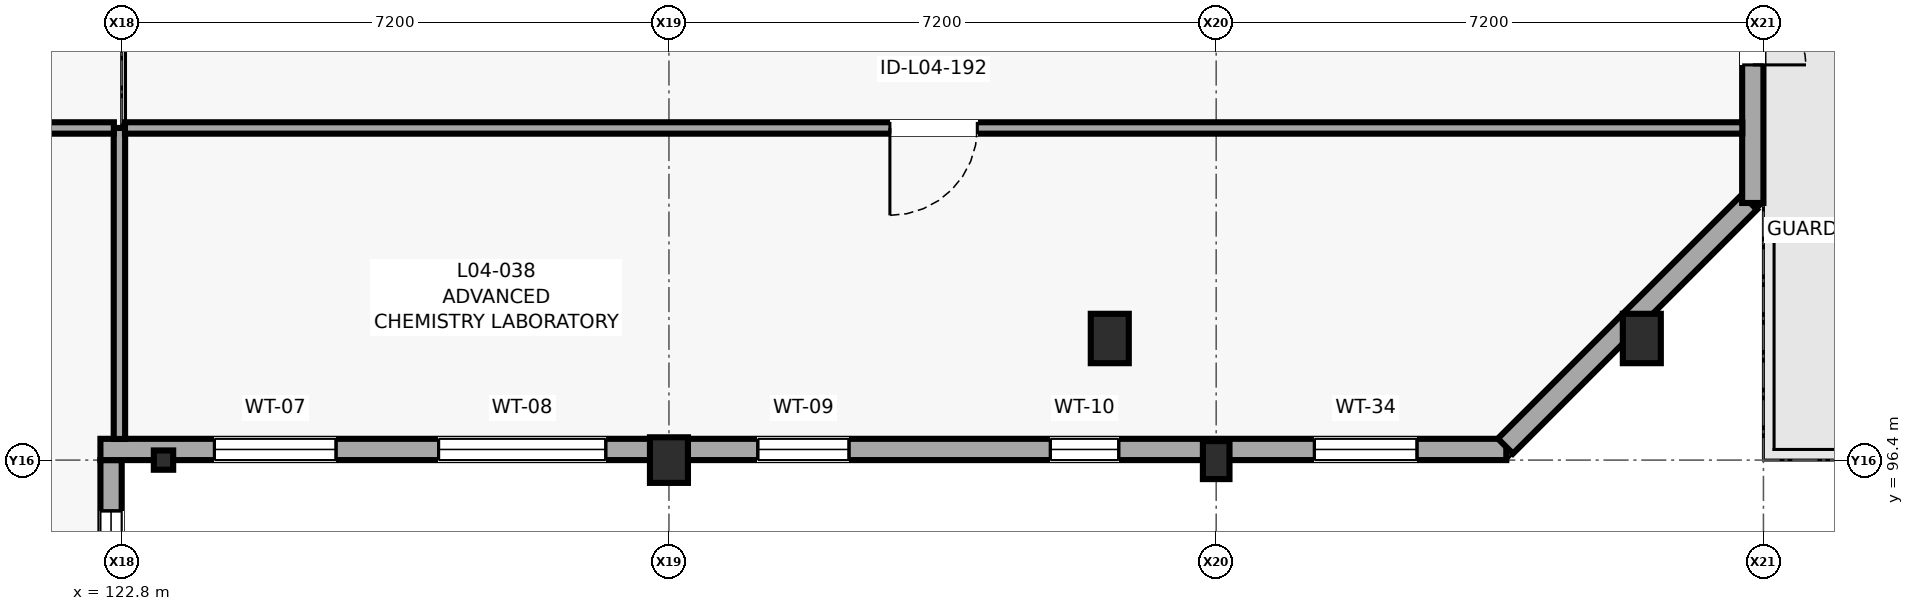
"""IFC4 building model, lengths in metres.
Left out: names, types, materials, properties, quantities, classifications, styles, units other than length and angle.
Written with IfcOpenShell. Run it as: python <this file> out.ifc"""

import sys

from ifc_helpers import new_model, si_unit, direction, frame, frame_2d, origin, origin_2d, place, context, subcontext, project, spatial, rectangle, i_section, extrude, element, fill, save


model = new_model("IFC4")
c1 = context("Model", 3, precision=1e-05, world=origin(), true_north=direction((0.0, 1.0)))
c2 = subcontext(c1, "Body", "Model", "MODEL_VIEW")
j1 = project(units=[si_unit("LENGTHUNIT", "METRE"), si_unit("PLANEANGLEUNIT", "RADIAN")], contexts=[c1])
p1 = place(None, origin())
s1 = spatial("IfcSite", under=j1, at=p1, CompositionType="ELEMENT")
p2 = place(p1, origin())
s2 = spatial("IfcBuilding", under=s1, at=p2, CompositionType="ELEMENT")
p3 = place(p2, frame((0.0, 0.0, 16.2)))
s3 = spatial("IfcBuildingStorey", under=s2, at=p3, CompositionType="ELEMENT", Elevation=16.2)
p4 = place(p3, frame((123.35, 96.4, 0.0), z_axis=(0.0, 0.0, 1.0), x_axis=(1.0, 0.0, 0.0)))
e1 = element("IfcColumn", 1, at=p4, inside=s3, PredefinedType="COLUMN", context=c2, shape_type="SweptSolid", body=[
    extrude(i_section(OverallWidth=0.255, OverallDepth=0.254, WebThickness=0.009, FlangeThickness=0.014, FilletRadius=0.013, at=origin_2d()), origin(), (0.0, 0.0, 1.0), 4.0),
])
p5 = place(p3, frame((130.0, 96.4, 0.0), z_axis=(0.0, 0.0, 1.0), x_axis=(1.0, 0.0, 0.0)))
e2 = element("IfcColumn", 2, at=p5, inside=s3, PredefinedType="PILASTER", context=c2, shape_type="SweptSolid", body=[
    extrude(rectangle(XDim=0.5, YDim=0.6, at=origin_2d()), origin(), (0.0, 0.0, 1.0), 4.0),
])
p6 = place(p3, frame((135.8, 98.0, 0.0), z_axis=(0.0, 0.0, 1.0), x_axis=(1.0, 0.0, 0.0)))
e3 = element("IfcColumn", 3, at=p6, inside=s3, PredefinedType="COLUMN", context=c2, shape_type="SweptSolid", body=[
    extrude(rectangle(XDim=0.5, YDim=0.65, at=origin_2d()), origin(), (0.0, 0.0, 1.0), 4.0),
])
p7 = place(p3, frame((137.2, 96.4, 0.0), z_axis=(0.0, 0.0, 1.0), x_axis=(1.0, 0.0, 0.0)))
e4 = element("IfcColumn", 4, at=p7, inside=s3, PredefinedType="PILASTER", context=c2, shape_type="SweptSolid", body=[
    extrude(rectangle(XDim=0.35, YDim=0.5, at=origin_2d()), origin(), (0.0, 0.0, 1.0), 4.0),
])
p8 = place(p3, frame((142.8, 98.0, 0.0), z_axis=(0.0, 0.0, 1.0), x_axis=(1.0, 0.0, 0.0)))
e5 = element("IfcColumn", 5, at=p8, inside=s3, PredefinedType="COLUMN", context=c2, shape_type="SweptSolid", body=[
    extrude(rectangle(XDim=0.5, YDim=0.65, at=origin_2d()), origin(), (0.0, 0.0, 1.0), 4.0),
])
p9 = place(p3, frame((122.66, 84.14, 0.0), z_axis=(0.0, 0.0, 1.0), x_axis=(0.0, 1.0, 0.0)))
e6 = element("IfcWall", 6, at=p9, inside=s3, PredefinedType="SOLIDWALL", context=c2, shape_type="SweptSolid", body=[
    extrude(rectangle(XDim=12.26, YDim=0.28, at=frame_2d((6.13, 0.0))), origin(), (0.0, 0.0, 1.0), 3.225),
])
p10 = place(p9, frame((2.343, 0.0, 0.75)))
e7 = element("IfcOpeningElement", 7, at=p10, cuts=e6, PredefinedType="OPENING", context=c2, shape_type="SweptSolid", body=[
    extrude(rectangle(XDim=1.1, YDim=2.1, at=frame_2d((0.55, 1.05))), frame((0.0, 0.15, 0.0), z_axis=(0.0, -1.0, 0.0), x_axis=(1.0, 0.0, 0.0)), (0.0, 0.0, 1.0), 0.3),
])
p11 = place(p9, frame((5.555, 0.0, 1.05)))
e8 = element("IfcOpeningElement", 8, at=p11, cuts=e6, PredefinedType="OPENING", context=c2, shape_type="SweptSolid", body=[
    extrude(rectangle(XDim=1.15, YDim=1.4, at=frame_2d((0.575, 0.7))), frame((0.0, 0.15, 0.0), z_axis=(0.0, -1.0, 0.0), x_axis=(1.0, 0.0, 0.0)), (0.0, 0.0, 1.0), 0.3),
])
p12 = place(p9, frame((10.542, 0.0, 1.05)))
e9 = element("IfcOpeningElement", 9, at=p12, cuts=e6, PredefinedType="OPENING", context=c2, shape_type="SweptSolid", body=[
    extrude(rectangle(XDim=1.05, YDim=1.3, at=frame_2d((0.525, 0.65))), frame((0.0, 0.15, 0.0), z_axis=(0.0, -1.0, 0.0), x_axis=(1.0, 0.0, 0.0)), (0.0, 0.0, 1.0), 0.3),
])
p13 = place(p3, frame((122.52, 96.54, 0.0), z_axis=(0.0, 0.0, 1.0), x_axis=(1.0, 0.0, 0.0)))
e10 = element("IfcWall", 10, at=p13, inside=s3, PredefinedType="SOLIDWALL", context=c2, shape_type="SweptSolid", body=[
    extrude(rectangle(XDim=18.497, YDim=0.28, at=frame_2d((9.249, 0.0))), origin(), (0.0, 0.0, 1.0), 3.025),
])
p14 = place(p13, frame((1.5, 0.0, 1.05)))
e11 = element("IfcOpeningElement", 11, at=p14, cuts=e10, PredefinedType="OPENING", context=c2, shape_type="SweptSolid", body=[
    extrude(rectangle(XDim=1.6, YDim=1.35, at=frame_2d((0.8, 0.675))), frame((0.0, 0.15, 0.0), z_axis=(0.0, -1.0, 0.0), x_axis=(1.0, 0.0, 0.0)), (0.0, 0.0, 1.0), 0.3),
])
p15 = place(p13, frame((4.449, 0.0, 1.05)))
e12 = element("IfcOpeningElement", 12, at=p15, cuts=e10, PredefinedType="OPENING", context=c2, shape_type="SweptSolid", body=[
    extrude(rectangle(XDim=2.2, YDim=1.35, at=frame_2d((1.1, 0.675))), frame((0.0, 0.15, 0.0), z_axis=(0.0, -1.0, 0.0), x_axis=(1.0, 0.0, 0.0)), (0.0, 0.0, 1.0), 0.3),
])
p16 = place(p13, frame((8.649, 0.0, 1.05)))
e13 = element("IfcOpeningElement", 13, at=p16, cuts=e10, PredefinedType="OPENING", context=c2, shape_type="SweptSolid", body=[
    extrude(rectangle(XDim=1.2, YDim=0.9, at=frame_2d((0.6, 0.45))), frame((0.0, 0.15, 0.0), z_axis=(0.0, -1.0, 0.0), x_axis=(1.0, 0.0, 0.0)), (0.0, 0.0, 1.0), 0.3),
])
p17 = place(p13, frame((12.498, 0.0, 1.05)))
e14 = element("IfcOpeningElement", 14, at=p17, cuts=e10, PredefinedType="OPENING", context=c2, shape_type="SweptSolid", body=[
    extrude(rectangle(XDim=0.9, YDim=0.9, at=frame_2d((0.45, 0.45))), frame((0.0, 0.15, 0.0), z_axis=(0.0, -1.0, 0.0), x_axis=(1.0, 0.0, 0.0)), (0.0, 0.0, 1.0), 0.3),
])
p18 = place(p13, frame((15.972, 0.0, 1.05)))
e15 = element("IfcOpeningElement", 15, at=p18, cuts=e10, PredefinedType="OPENING", context=c2, shape_type="SweptSolid", body=[
    extrude(rectangle(XDim=1.35, YDim=1.2, at=frame_2d((0.675, 0.6))), frame((0.0, 0.15, 0.0), z_axis=(0.0, -1.0, 0.0), x_axis=(1.0, 0.0, 0.0)), (0.0, 0.0, 1.0), 0.3),
])
p19 = place(p3, frame((141.005, 96.584, 0.0), z_axis=(0.0, 0.0, 1.0), x_axis=(0.707133661755, 0.707079899597, 0.0)))
e16 = element("IfcWall", 16, at=p19, inside=s3, PredefinedType="SOLIDWALL", context=c2, shape_type="SweptSolid", body=[
    extrude(rectangle(XDim=4.541, YDim=0.28, at=frame_2d((2.271, 0.0))), origin(), (0.0, 0.0, 1.0), 3.78),
])
p20 = place(p3, frame((144.26, 99.783, 0.0), z_axis=(0.0, 0.0, 1.0), x_axis=(0.0, 1.0, 0.0)))
e17 = element("IfcWall", 17, at=p20, inside=s3, PredefinedType="SOLIDWALL", context=c2, shape_type="SweptSolid", body=[
    extrude(rectangle(XDim=8.834, YDim=0.28, at=frame_2d((4.417, 0.0))), origin(), (0.0, 0.0, 1.0), 3.78),
])
p21 = place(p20, frame((1.817, 0.0, 0.0)))
e18 = element("IfcOpeningElement", 18, at=p21, cuts=e17, PredefinedType="OPENING", context=c2, shape_type="SweptSolid", body=[
    extrude(rectangle(XDim=1.4, YDim=2.15, at=frame_2d((0.7, 1.075))), frame((0.0, 0.15, 0.0), z_axis=(0.0, -1.0, 0.0), x_axis=(1.0, 0.0, 0.0)), (0.0, 0.0, 1.0), 0.3),
])
p22 = place(p20, frame((5.876, 0.0, 0.75)))
e19 = element("IfcOpeningElement", 19, at=p22, cuts=e17, PredefinedType="OPENING", context=c2, shape_type="SweptSolid", body=[
    extrude(rectangle(XDim=1.5, YDim=2.2, at=frame_2d((0.75, 1.1))), frame((0.0, 0.15, 0.0), z_axis=(0.0, -1.0, 0.0), x_axis=(1.0, 0.0, 0.0)), (0.0, 0.0, 1.0), 0.3),
])
p23 = place(p3, frame((122.77, 96.678, 0.0), z_axis=(0.0, 0.0, 1.0), x_axis=(0.0, 1.0, 0.0)))
e20 = element("IfcWall", 20, at=p23, inside=s3, PredefinedType="PARTITIONING", context=c2, shape_type="SweptSolid", body=[
    extrude(rectangle(XDim=4.092, YDim=0.15, at=frame_2d((2.046, 0.0))), origin(), (0.0, 0.0, 1.0), 3.775),
])
p24 = place(p3, frame((122.697, 100.77, 0.0), z_axis=(0.0, 0.0, 1.0), x_axis=(-1.0, 0.0, 0.0)))
e21 = element("IfcWall", 21, at=p24, inside=s3, PredefinedType="PARTITIONING", context=c2, shape_type="SweptSolid", body=[
    extrude(rectangle(XDim=4.009, YDim=0.15, at=frame_2d((2.004, 0.0))), origin(), (0.0, 0.0, 1.0), 3.775),
])
p25 = place(p3, frame((144.122, 100.77, 0.0), z_axis=(0.0, 0.0, 1.0), x_axis=(-1.0, 0.0, 0.0)))
e22 = element("IfcWall", 22, at=p25, inside=s3, PredefinedType="PARTITIONING", context=c2, shape_type="SweptSolid", body=[
    extrude(rectangle(XDim=21.279, YDim=0.15, at=frame_2d((10.64, 0.0))), origin(), (0.0, 0.0, 1.0), 3.76),
])
p26 = place(p25, frame((10.065, 0.0, 0.0)))
e23 = element("IfcOpeningElement", 23, at=p26, cuts=e22, PredefinedType="OPENING", context=c2, shape_type="SweptSolid", body=[
    extrude(rectangle(XDim=1.15, YDim=2.2, at=frame_2d((0.575, 1.1))), frame((0.0, 0.085, 0.0), z_axis=(0.0, -1.0, 0.0), x_axis=(1.0, 0.0, 0.0)), (0.0, 0.0, 1.0), 0.17),
])
p27 = place(p21, frame((1.4, 0.0, 0.0), z_axis=(0.0, 0.0, 1.0), x_axis=(-1.0, 0.0, 0.0)))
e24 = element("IfcDoor", 24, at=p27, inside=s3, OperationType="DOUBLE_DOOR_SINGLE_SWING", PredefinedType="DOOR", context=c2, shape_type="SweptSolid", body=[
    extrude(rectangle(XDim=1.4, YDim=2.15, at=frame_2d((0.7, 1.075))), frame((0.0, 0.025, 0.0), z_axis=(0.0, -1.0, 0.0), x_axis=(1.0, 0.0, 0.0)), (0.0, 0.0, 1.0), 0.05),
])
fill(e18, e24)
p28 = place(p12, origin())
e25 = element("IfcWindow", 25, at=p28, inside=s3, PartitioningType="SINGLE_PANEL", PredefinedType="WINDOW", context=c2, shape_type="SweptSolid", body=[
    extrude(rectangle(XDim=1.05, YDim=1.3, at=frame_2d((0.525, 0.65))), frame((0.0, 0.03, 0.0), z_axis=(0.0, -1.0, 0.0), x_axis=(1.0, 0.0, 0.0)), (0.0, 0.0, 1.0), 0.06),
])
fill(e9, e25)
p29 = place(p14, origin())
e26 = element("IfcWindow", 26, at=p29, inside=s3, PartitioningType="SINGLE_PANEL", PredefinedType="WINDOW", context=c2, shape_type="SweptSolid", body=[
    extrude(rectangle(XDim=1.6, YDim=1.35, at=frame_2d((0.8, 0.675))), frame((0.0, 0.03, 0.0), z_axis=(0.0, -1.0, 0.0), x_axis=(1.0, 0.0, 0.0)), (0.0, 0.0, 1.0), 0.06),
])
fill(e11, e26)
p30 = place(p15, origin())
e27 = element("IfcWindow", 27, at=p30, inside=s3, PartitioningType="SINGLE_PANEL", PredefinedType="WINDOW", context=c2, shape_type="SweptSolid", body=[
    extrude(rectangle(XDim=2.2, YDim=1.35, at=frame_2d((1.1, 0.675))), frame((0.0, 0.03, 0.0), z_axis=(0.0, -1.0, 0.0), x_axis=(1.0, 0.0, 0.0)), (0.0, 0.0, 1.0), 0.06),
])
fill(e12, e27)
p31 = place(p16, origin())
e28 = element("IfcWindow", 28, at=p31, inside=s3, PartitioningType="SINGLE_PANEL", PredefinedType="WINDOW", context=c2, shape_type="SweptSolid", body=[
    extrude(rectangle(XDim=1.2, YDim=0.9, at=frame_2d((0.6, 0.45))), frame((0.0, 0.03, 0.0), z_axis=(0.0, -1.0, 0.0), x_axis=(1.0, 0.0, 0.0)), (0.0, 0.0, 1.0), 0.06),
])
fill(e13, e28)
p32 = place(p17, origin())
e29 = element("IfcWindow", 29, at=p32, inside=s3, PartitioningType="SINGLE_PANEL", PredefinedType="WINDOW", context=c2, shape_type="SweptSolid", body=[
    extrude(rectangle(XDim=0.9, YDim=0.9, at=frame_2d((0.45, 0.45))), frame((0.0, 0.03, 0.0), z_axis=(0.0, -1.0, 0.0), x_axis=(1.0, 0.0, 0.0)), (0.0, 0.0, 1.0), 0.06),
])
fill(e14, e29)
p33 = place(p18, origin())
e30 = element("IfcWindow", 30, at=p33, inside=s3, PartitioningType="SINGLE_PANEL", PredefinedType="WINDOW", context=c2, shape_type="SweptSolid", body=[
    extrude(rectangle(XDim=1.35, YDim=1.2, at=frame_2d((0.675, 0.6))), frame((0.0, 0.03, 0.0), z_axis=(0.0, -1.0, 0.0), x_axis=(1.0, 0.0, 0.0)), (0.0, 0.0, 1.0), 0.06),
])
fill(e15, e30)
p34 = place(p26, origin())
e31 = element("IfcDoor", 31, at=p34, inside=s3, OperationType="SINGLE_SWING_RIGHT", PredefinedType="DOOR", context=c2, shape_type="SweptSolid", body=[
    extrude(rectangle(XDim=1.15, YDim=2.2, at=frame_2d((0.575, 1.1))), frame((0.0, 0.025, 0.0), z_axis=(0.0, -1.0, 0.0), x_axis=(1.0, 0.0, 0.0)), (0.0, 0.0, 1.0), 0.05),
])
fill(e23, e31)
save(model, sys.argv[1])
